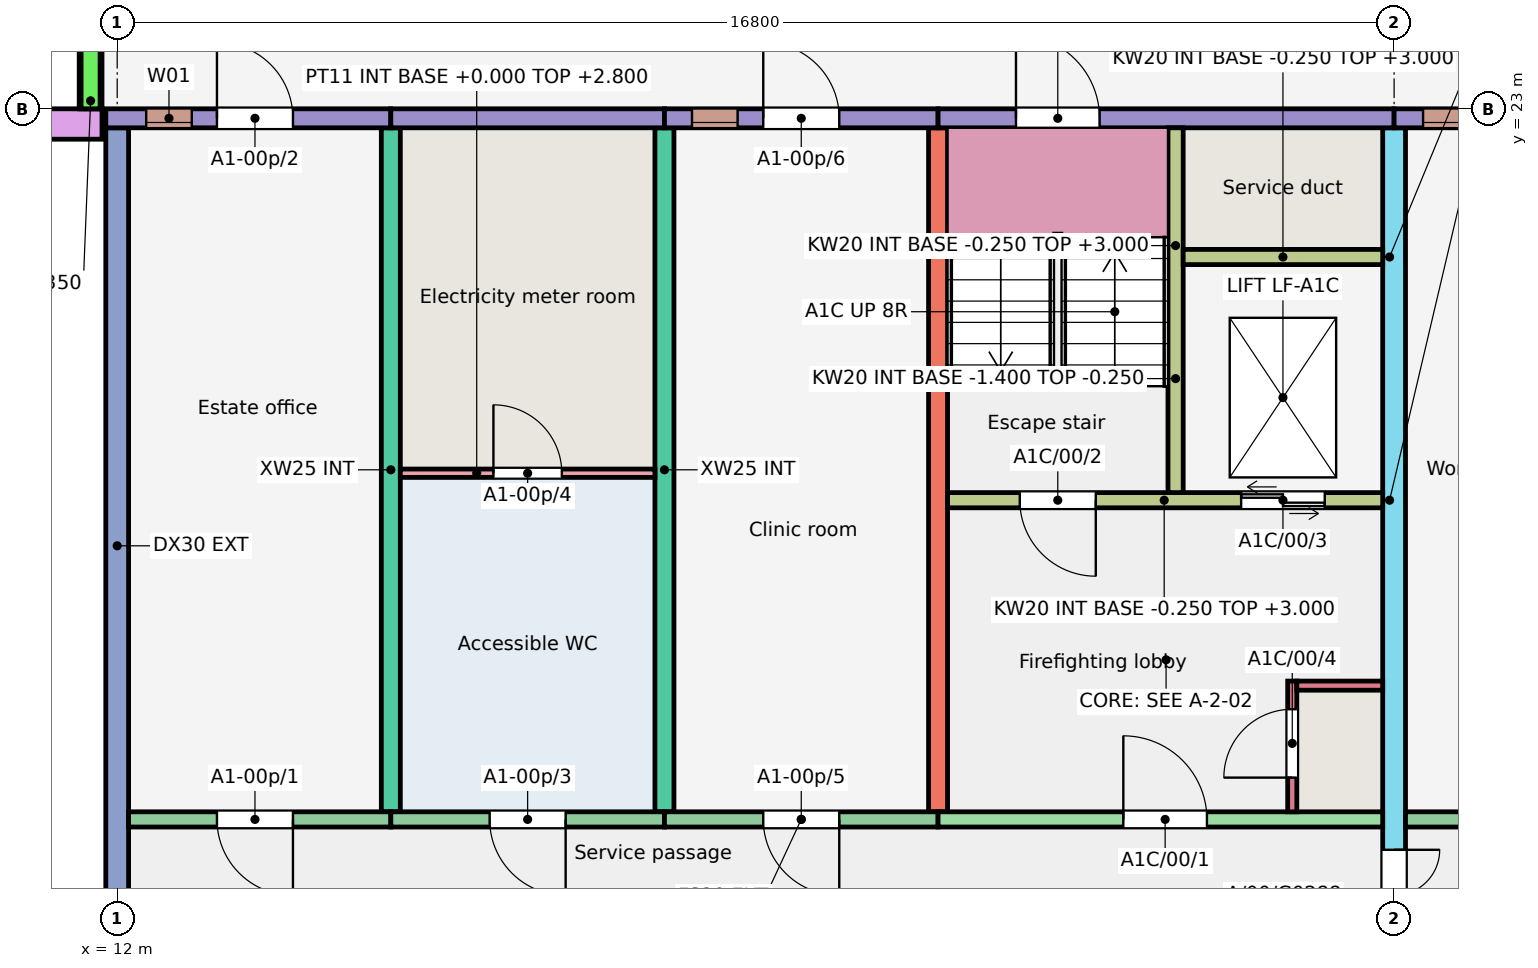
"""IFC4 building model, lengths in metres.
Left out: names, types, materials, properties, quantities, classifications, styles, units other than length and angle.
Written with IfcOpenShell. Run it as: python <this file> out.ifc"""

import sys

from ifc_helpers import new_model, si_unit, direction, frame, frame_2d, origin, place, context, subcontext, project, spatial, rectangle, extrude, element, fill, save


model = new_model("IFC4")
c1 = context("Model", 3, precision=1e-05, world=origin(), true_north=direction((0.0, 1.0)))
c2 = subcontext(c1, "Body", "Model", "MODEL_VIEW")
j1 = project(units=[si_unit("LENGTHUNIT", "METRE"), si_unit("PLANEANGLEUNIT", "RADIAN")], contexts=[c1])
p1 = place(None, origin())
s1 = spatial("IfcSite", under=j1, at=p1, CompositionType="ELEMENT")
p2 = place(p1, origin())
s2 = spatial("IfcBuilding", under=s1, at=p2, CompositionType="ELEMENT")
p3 = place(p2, origin())
s3 = spatial("IfcBuildingStorey", under=s2, at=p3, CompositionType="ELEMENT", Elevation=0.0)
p4 = place(p3, frame((12.0, 11.75, -0.25), z_axis=(0.0, 0.0, 1.0), x_axis=(0.0, 1.0, 0.0)))
e1 = element("IfcWall", 1, at=p4, inside=s3, PredefinedType="SHEAR", context=c2, shape_type="SweptSolid", body=[
    extrude(rectangle(XDim=11.0, YDim=0.3, at=frame_2d((5.5, 0.0))), origin(), (0.0, 0.0, 1.0), 3.25),
])
for number, where, z_axis, x_axis in (
    (2, (15.6, 13.75, -0.25), (0.0, 0.0, 1.0), (0.0, 1.0, 0.0)),
    (3, (19.2, 13.75, -0.25), (0.0, 0.0, 1.0), (0.0, 1.0, 0.0)),
    (4, (22.8, 13.75, -0.25), (0.0, 0.0, 1.0), (0.0, 1.0, 0.0)),
):
    element("IfcWall", number, at=place(p3, frame(where, z_axis=z_axis, x_axis=x_axis)), inside=s3, PredefinedType="SHEAR", context=c2, shape_type="SweptSolid", body=[
        extrude(rectangle(XDim=9.0, YDim=0.25, at=frame_2d((4.5, 0.0))), origin(), (0.0, 0.0, 1.0), 3.25),
    ])
p5 = place(p3, frame((28.8, 11.75, -0.25), z_axis=(0.0, 0.0, 1.0), x_axis=(0.0, 1.0, 0.0)))
e5 = element("IfcWall", 5, at=p5, inside=s3, PredefinedType="SHEAR", context=c2, shape_type="SweptSolid", body=[
    extrude(rectangle(XDim=11.0, YDim=0.3, at=frame_2d((5.5, 0.0))), origin(), (0.0, 0.0, 1.0), 3.25),
])
p6 = place(p5, frame((0.3, 0.0, 0.25)))
e6 = element("IfcOpeningElement", 6, at=p6, cuts=e5, PredefinedType="OPENING", context=c2, shape_type="SweptSolid", body=[
    extrude(rectangle(XDim=1.2, YDim=2.1, at=frame_2d((0.6, 1.05))), frame((0.0, 0.16, 0.0), z_axis=(0.0, -1.0, 0.0), x_axis=(1.0, 0.0, 0.0)), (0.0, 0.0, 1.0), 0.32),
])
p7 = place(p3, frame((11.85, 22.875, -0.25), z_axis=(0.0, 0.0, 1.0), x_axis=(1.0, 0.0, 0.0)))
e7 = element("IfcWall", 7, at=p7, inside=s3, PredefinedType="SOLIDWALL", context=c2, shape_type="SweptSolid", body=[
    extrude(rectangle(XDim=3.75, YDim=0.25, at=frame_2d((1.875, 0.0))), origin(), (0.0, 0.0, 1.0), 3.25),
])
p8 = place(p7, frame((0.531, 0.0, 2.05)))
e8 = element("IfcOpeningElement", 8, at=p8, cuts=e7, PredefinedType="OPENING", context=c2, shape_type="SweptSolid", body=[
    extrude(rectangle(XDim=0.6, YDim=0.6, at=frame_2d((0.3, 0.3))), frame((0.0, 0.135, 0.0), z_axis=(0.0, -1.0, 0.0), x_axis=(1.0, 0.0, 0.0)), (0.0, 0.0, 1.0), 0.27),
])
p9 = place(p7, frame((1.462, 0.0, 0.25)))
e9 = element("IfcOpeningElement", 9, at=p9, cuts=e7, PredefinedType="OPENING", context=c2, shape_type="SweptSolid", body=[
    extrude(rectangle(XDim=1.0, YDim=2.1, at=frame_2d((0.5, 1.05))), frame((0.0, 0.135, 0.0), z_axis=(0.0, -1.0, 0.0), x_axis=(1.0, 0.0, 0.0)), (0.0, 0.0, 1.0), 0.27),
])
p10 = place(p3, frame((12.15, 13.65, -0.25), z_axis=(0.0, 0.0, 1.0), x_axis=(1.0, 0.0, 0.0)))
e10 = element("IfcWall", 10, at=p10, inside=s3, PredefinedType="SOLIDWALL", context=c2, shape_type="SweptSolid", body=[
    extrude(rectangle(XDim=3.45, YDim=0.2, at=frame_2d((1.725, 0.0))), origin(), (0.0, 0.0, 1.0), 3.25),
])
p11 = place(p10, frame((1.163, 0.0, 0.25)))
e11 = element("IfcOpeningElement", 11, at=p11, cuts=e10, PredefinedType="OPENING", context=c2, shape_type="SweptSolid", body=[
    extrude(rectangle(XDim=1.0, YDim=2.1, at=frame_2d((0.5, 1.05))), frame((0.0, 0.11, 0.0), z_axis=(0.0, -1.0, 0.0), x_axis=(1.0, 0.0, 0.0)), (0.0, 0.0, 1.0), 0.22),
])
p12 = place(p3, frame((15.6, 22.875, -0.25), z_axis=(0.0, 0.0, 1.0), x_axis=(1.0, 0.0, 0.0)))
e12 = element("IfcWall", 12, at=p12, inside=s3, PredefinedType="SOLIDWALL", context=c2, shape_type="SweptSolid", body=[
    extrude(rectangle(XDim=3.6, YDim=0.25, at=frame_2d((1.8, 0.0))), origin(), (0.0, 0.0, 1.0), 3.25),
])
p13 = place(p3, frame((15.6, 13.65, -0.25), z_axis=(0.0, 0.0, 1.0), x_axis=(1.0, 0.0, 0.0)))
e13 = element("IfcWall", 13, at=p13, inside=s3, PredefinedType="SOLIDWALL", context=c2, shape_type="SweptSolid", body=[
    extrude(rectangle(XDim=3.6, YDim=0.2, at=frame_2d((1.8, 0.0))), origin(), (0.0, 0.0, 1.0), 3.25),
])
p14 = place(p13, frame((1.3, 0.0, 0.25)))
e14 = element("IfcOpeningElement", 14, at=p14, cuts=e13, PredefinedType="OPENING", context=c2, shape_type="SweptSolid", body=[
    extrude(rectangle(XDim=1.0, YDim=2.1, at=frame_2d((0.5, 1.05))), frame((0.0, 0.11, 0.0), z_axis=(0.0, -1.0, 0.0), x_axis=(1.0, 0.0, 0.0)), (0.0, 0.0, 1.0), 0.22),
])
p15 = place(p3, frame((19.2, 22.875, -0.25), z_axis=(0.0, 0.0, 1.0), x_axis=(1.0, 0.0, 0.0)))
e15 = element("IfcWall", 15, at=p15, inside=s3, PredefinedType="SOLIDWALL", context=c2, shape_type="SweptSolid", body=[
    extrude(rectangle(XDim=3.6, YDim=0.25, at=frame_2d((1.8, 0.0))), origin(), (0.0, 0.0, 1.0), 3.25),
])
p16 = place(p15, frame((0.363, 0.0, 2.05)))
e16 = element("IfcOpeningElement", 16, at=p16, cuts=e15, PredefinedType="OPENING", context=c2, shape_type="SweptSolid", body=[
    extrude(rectangle(XDim=0.6, YDim=0.6, at=frame_2d((0.3, 0.3))), frame((0.0, 0.135, 0.0), z_axis=(0.0, -1.0, 0.0), x_axis=(1.0, 0.0, 0.0)), (0.0, 0.0, 1.0), 0.27),
])
p17 = place(p15, frame((1.3, 0.0, 0.25)))
e17 = element("IfcOpeningElement", 17, at=p17, cuts=e15, PredefinedType="OPENING", context=c2, shape_type="SweptSolid", body=[
    extrude(rectangle(XDim=1.0, YDim=2.1, at=frame_2d((0.5, 1.05))), frame((0.0, 0.135, 0.0), z_axis=(0.0, -1.0, 0.0), x_axis=(1.0, 0.0, 0.0)), (0.0, 0.0, 1.0), 0.27),
])
p18 = place(p3, frame((19.2, 13.65, -0.25), z_axis=(0.0, 0.0, 1.0), x_axis=(1.0, 0.0, 0.0)))
e18 = element("IfcWall", 18, at=p18, inside=s3, PredefinedType="SOLIDWALL", context=c2, shape_type="SweptSolid", body=[
    extrude(rectangle(XDim=3.6, YDim=0.2, at=frame_2d((1.8, 0.0))), origin(), (0.0, 0.0, 1.0), 3.25),
])
p19 = place(p18, frame((1.3, 0.0, 0.25)))
e19 = element("IfcOpeningElement", 19, at=p19, cuts=e18, PredefinedType="OPENING", context=c2, shape_type="SweptSolid", body=[
    extrude(rectangle(XDim=1.0, YDim=2.1, at=frame_2d((0.5, 1.05))), frame((0.0, 0.11, 0.0), z_axis=(0.0, -1.0, 0.0), x_axis=(1.0, 0.0, 0.0)), (0.0, 0.0, 1.0), 0.22),
])
p20 = place(p3, frame((22.8, 22.875, -0.25), z_axis=(0.0, 0.0, 1.0), x_axis=(1.0, 0.0, 0.0)))
e20 = element("IfcWall", 20, at=p20, inside=s3, PredefinedType="SOLIDWALL", context=c2, shape_type="SweptSolid", body=[
    extrude(rectangle(XDim=6.0, YDim=0.25, at=frame_2d((3.0, 0.0))), origin(), (0.0, 0.0, 1.0), 3.25),
])
p21 = place(p20, frame((1.025, 0.0, 0.25)))
e21 = element("IfcOpeningElement", 21, at=p21, cuts=e20, PredefinedType="OPENING", context=c2, shape_type="SweptSolid", body=[
    extrude(rectangle(XDim=1.1, YDim=2.1, at=frame_2d((0.55, 1.05))), frame((0.0, 0.135, 0.0), z_axis=(0.0, -1.0, 0.0), x_axis=(1.0, 0.0, 0.0)), (0.0, 0.0, 1.0), 0.27),
])
p22 = place(p3, frame((22.8, 13.65, -0.25), z_axis=(0.0, 0.0, 1.0), x_axis=(1.0, 0.0, 0.0)))
e22 = element("IfcWall", 22, at=p22, inside=s3, PredefinedType="SHEAR", context=c2, shape_type="SweptSolid", body=[
    extrude(rectangle(XDim=5.85, YDim=0.2, at=frame_2d((2.925, 0.0))), origin(), (0.0, 0.0, 1.0), 3.25),
])
p23 = place(p22, frame((2.438, 0.0, 0.25)))
e23 = element("IfcOpeningElement", 23, at=p23, cuts=e22, PredefinedType="OPENING", context=c2, shape_type="SweptSolid", body=[
    extrude(rectangle(XDim=1.1, YDim=2.1, at=frame_2d((0.55, 1.05))), frame((0.0, 0.11, 0.0), z_axis=(0.0, -1.0, 0.0), x_axis=(1.0, 0.0, 0.0)), (0.0, 0.0, 1.0), 0.22),
])
p24 = place(p3, frame((22.925, 17.85, -0.25), z_axis=(0.0, 0.0, 1.0), x_axis=(1.0, 0.0, 0.0)))
e24 = element("IfcWall", 24, at=p24, inside=s3, PredefinedType="SHEAR", context=c2, shape_type="SweptSolid", body=[
    extrude(rectangle(XDim=5.725, YDim=0.2, at=frame_2d((2.862, 0.0))), origin(), (0.0, 0.0, 1.0), 3.25),
])
p25 = place(p24, frame((0.95, 0.0, 0.25)))
e25 = element("IfcOpeningElement", 25, at=p25, cuts=e24, PredefinedType="OPENING", context=c2, shape_type="SweptSolid", body=[
    extrude(rectangle(XDim=1.0, YDim=2.1, at=frame_2d((0.5, 1.05))), frame((0.0, 0.11, 0.0), z_axis=(0.0, -1.0, 0.0), x_axis=(1.0, 0.0, 0.0)), (0.0, 0.0, 1.0), 0.22),
])
p26 = place(p24, frame((3.863, 0.0, 0.25)))
e26 = element("IfcOpeningElement", 26, at=p26, cuts=e24, PredefinedType="OPENING", context=c2, shape_type="SweptSolid", body=[
    extrude(rectangle(XDim=1.1, YDim=2.1, at=frame_2d((0.55, 1.05))), frame((0.0, 0.11, 0.0), z_axis=(0.0, -1.0, 0.0), x_axis=(1.0, 0.0, 0.0)), (0.0, 0.0, 1.0), 0.22),
])
p27 = place(p3, frame((25.925, 17.95, -0.25), z_axis=(0.0, 0.0, 1.0), x_axis=(0.0, 1.0, 0.0)))
e27 = element("IfcWall", 27, at=p27, inside=s3, PredefinedType="SHEAR", context=c2, shape_type="SweptSolid", body=[
    extrude(rectangle(XDim=4.8, YDim=0.2, at=frame_2d((2.4, 0.0))), origin(), (0.0, 0.0, 1.0), 3.25),
])
p28 = place(p3, frame((26.025, 21.05, -0.25), z_axis=(0.0, 0.0, 1.0), x_axis=(1.0, 0.0, 0.0)))
e28 = element("IfcWall", 28, at=p28, inside=s3, PredefinedType="SHEAR", context=c2, shape_type="SweptSolid", body=[
    extrude(rectangle(XDim=2.625, YDim=0.2, at=frame_2d((1.312, 0.0))), origin(), (0.0, 0.0, 1.0), 3.25),
])
p29 = place(p3, frame((27.46, 13.75, -0.25), z_axis=(0.0, 0.0, 1.0), x_axis=(0.0, 1.0, 0.0)))
e29 = element("IfcWall", 29, at=p29, inside=s3, PredefinedType="SHEAR", context=c2, shape_type="SweptSolid", body=[
    extrude(rectangle(XDim=1.72, YDim=0.12, at=frame_2d((0.86, 0.0))), origin(), (0.0, 0.0, 1.0), 3.25),
])
p30 = place(p29, frame((0.45, 0.0, 0.25)))
e30 = element("IfcOpeningElement", 30, at=p30, cuts=e29, PredefinedType="OPENING", context=c2, shape_type="SweptSolid", body=[
    extrude(rectangle(XDim=0.9, YDim=2.1, at=frame_2d((0.45, 1.05))), frame((0.0, 0.07, 0.0), z_axis=(0.0, -1.0, 0.0), x_axis=(1.0, 0.0, 0.0)), (0.0, 0.0, 1.0), 0.14),
])
p31 = place(p3, frame((27.52, 15.41, -0.25), z_axis=(0.0, 0.0, 1.0), x_axis=(1.0, 0.0, 0.0)))
e31 = element("IfcWall", 31, at=p31, inside=s3, PredefinedType="SHEAR", context=c2, shape_type="SweptSolid", body=[
    extrude(rectangle(XDim=1.13, YDim=0.12, at=frame_2d((0.565, 0.0))), origin(), (0.0, 0.0, 1.0), 3.25),
])
p32 = place(p3, frame((28.8, 22.875, -0.25), z_axis=(0.0, 0.0, 1.0), x_axis=(1.0, 0.0, 0.0)))
e32 = element("IfcWall", 32, at=p32, inside=s3, PredefinedType="SOLIDWALL", context=c2, shape_type="SweptSolid", body=[
    extrude(rectangle(XDim=3.6, YDim=0.25, at=frame_2d((1.8, 0.0))), origin(), (0.0, 0.0, 1.0), 3.25),
])
p33 = place(p32, frame((0.381, 0.0, 2.05)))
e33 = element("IfcOpeningElement", 33, at=p33, cuts=e32, PredefinedType="OPENING", context=c2, shape_type="SweptSolid", body=[
    extrude(rectangle(XDim=0.6, YDim=0.6, at=frame_2d((0.3, 0.3))), frame((0.0, 0.135, 0.0), z_axis=(0.0, -1.0, 0.0), x_axis=(1.0, 0.0, 0.0)), (0.0, 0.0, 1.0), 0.27),
])
p34 = place(p32, frame((1.312, 0.0, 0.25)))
e34 = element("IfcOpeningElement", 34, at=p34, cuts=e32, PredefinedType="OPENING", context=c2, shape_type="SweptSolid", body=[
    extrude(rectangle(XDim=1.0, YDim=2.1, at=frame_2d((0.5, 1.05))), frame((0.0, 0.135, 0.0), z_axis=(0.0, -1.0, 0.0), x_axis=(1.0, 0.0, 0.0)), (0.0, 0.0, 1.0), 0.27),
])
p35 = place(p3, frame((28.95, 13.65, -0.25), z_axis=(0.0, 0.0, 1.0), x_axis=(1.0, 0.0, 0.0)))
e35 = element("IfcWall", 35, at=p35, inside=s3, PredefinedType="SOLIDWALL", context=c2, shape_type="SweptSolid", body=[
    extrude(rectangle(XDim=3.45, YDim=0.2, at=frame_2d((1.725, 0.0))), origin(), (0.0, 0.0, 1.0), 3.25),
])
p36 = place(p35, frame((1.163, 0.0, 0.25)))
e36 = element("IfcOpeningElement", 36, at=p36, cuts=e35, PredefinedType="OPENING", context=c2, shape_type="SweptSolid", body=[
    extrude(rectangle(XDim=1.0, YDim=2.1, at=frame_2d((0.5, 1.05))), frame((0.0, 0.11, 0.0), z_axis=(0.0, -1.0, 0.0), x_axis=(1.0, 0.0, 0.0)), (0.0, 0.0, 1.0), 0.22),
])
for number, where, z_axis, x_axis in (
    (37, (25.825, 17.85, -1.4), (0.0, 0.0, 1.0), (1.0, 0.0, 0.0)),
    (38, (25.825, 21.05, -1.4), (0.0, 0.0, 1.0), (1.0, 0.0, 0.0)),
):
    element("IfcWall", number, at=place(p3, frame(where, z_axis=z_axis, x_axis=x_axis)), inside=s3, PredefinedType="SHEAR", context=c2, shape_type="SweptSolid", body=[
        extrude(rectangle(XDim=2.975, YDim=0.2, at=frame_2d((1.488, 0.0))), origin(), (0.0, 0.0, 1.0), 1.15),
    ])
p37 = place(p3, frame((25.925, 17.95, -1.4), z_axis=(0.0, 0.0, 1.0), x_axis=(0.0, 1.0, 0.0)))
e39 = element("IfcWall", 39, at=p37, inside=s3, PredefinedType="SHEAR", context=c2, shape_type="SweptSolid", body=[
    extrude(rectangle(XDim=3.0, YDim=0.2, at=frame_2d((1.5, 0.0))), origin(), (0.0, 0.0, 1.0), 1.15),
])
p38 = place(p3, frame((28.725, 17.95, -1.4), z_axis=(0.0, 0.0, 1.0), x_axis=(0.0, 1.0, 0.0)))
e40 = element("IfcWall", 40, at=p38, inside=s3, PredefinedType="SHEAR", context=c2, shape_type="SweptSolid", body=[
    extrude(rectangle(XDim=3.0, YDim=0.15, at=frame_2d((1.5, 0.0))), origin(), (0.0, 0.0, 1.0), 1.15),
])
p39 = place(p3, frame((6.05, 22.8, -0.25), z_axis=(0.0, 0.0, 1.0), x_axis=(1.0, 0.0, 0.0)))
e41 = element("IfcWall", 41, at=p39, inside=s3, PredefinedType="SOLIDWALL", context=c2, shape_type="SweptSolid", body=[
    extrude(rectangle(XDim=5.75, YDim=0.4, at=frame_2d((2.875, 0.0))), origin(), (0.0, 0.0, 1.0), 3.25),
])
p40 = place(p3, frame((11.65, 23.0, -0.25), z_axis=(0.0, 0.0, 1.0), x_axis=(0.0, 1.0, 0.0)))
e42 = element("IfcWall", 42, at=p40, inside=s3, PredefinedType="SOLIDWALL", context=c2, shape_type="SweptSolid", body=[
    extrude(rectangle(XDim=10.5, YDim=0.3, at=frame_2d((5.25, 0.0))), origin(), (0.0, 0.0, 1.0), 2.5),
])
p41 = place(p3, frame((11.65, 23.0, 2.25), z_axis=(0.0, 0.0, 1.0), x_axis=(0.0, 1.0, 0.0)))
e43 = element("IfcWall", 43, at=p41, inside=s3, PredefinedType="PARAPET", context=c2, shape_type="SweptSolid", body=[
    extrude(rectangle(XDim=10.5, YDim=0.25, at=frame_2d((5.25, 0.0))), origin(), (0.0, 0.0, 1.0), 1.1),
])
p42 = place(p3, frame((15.725, 18.205, 0.0), z_axis=(0.0, 0.0, 1.0), x_axis=(1.0, 0.0, 0.0)))
e44 = element("IfcWall", 44, at=p42, inside=s3, PredefinedType="PARTITIONING", context=c2, shape_type="SweptSolid", body=[
    extrude(rectangle(XDim=3.35, YDim=0.11, at=frame_2d((1.675, 0.0))), origin(), (0.0, 0.0, 1.0), 2.8),
])
p43 = place(p42, frame((1.225, 0.0, 0.0)))
e45 = element("IfcOpeningElement", 45, at=p43, cuts=e44, PredefinedType="OPENING", context=c2, shape_type="SweptSolid", body=[
    extrude(rectangle(XDim=0.9, YDim=2.1, at=frame_2d((0.45, 1.05))), frame((0.0, 0.065, 0.0), z_axis=(0.0, -1.0, 0.0), x_axis=(1.0, 0.0, 0.0)), (0.0, 0.0, 1.0), 0.13),
])
p44 = place(p8, origin())
e46 = element("IfcWindow", 46, at=p44, inside=s3, PartitioningType="SINGLE_PANEL", PredefinedType="WINDOW", context=c2, shape_type="SweptSolid", body=[
    extrude(rectangle(XDim=0.6, YDim=0.6, at=frame_2d((0.3, 0.3))), frame((0.0, -0.025, 0.0), z_axis=(0.0, -1.0, 0.0), x_axis=(1.0, 0.0, 0.0)), (0.0, 0.0, 1.0), 0.06),
])
fill(e8, e46)
p45 = place(p16, origin())
e47 = element("IfcWindow", 47, at=p45, inside=s3, PartitioningType="SINGLE_PANEL", PredefinedType="WINDOW", context=c2, shape_type="SweptSolid", body=[
    extrude(rectangle(XDim=0.6, YDim=0.6, at=frame_2d((0.3, 0.3))), frame((0.0, -0.025, 0.0), z_axis=(0.0, -1.0, 0.0), x_axis=(1.0, 0.0, 0.0)), (0.0, 0.0, 1.0), 0.06),
])
fill(e16, e47)
p46 = place(p33, origin())
e48 = element("IfcWindow", 48, at=p46, inside=s3, PartitioningType="SINGLE_PANEL", PredefinedType="WINDOW", context=c2, shape_type="SweptSolid", body=[
    extrude(rectangle(XDim=0.6, YDim=0.6, at=frame_2d((0.3, 0.3))), frame((0.0, -0.025, 0.0), z_axis=(0.0, -1.0, 0.0), x_axis=(1.0, 0.0, 0.0)), (0.0, 0.0, 1.0), 0.06),
])
fill(e33, e48)
p47 = place(p11, origin())
e49 = element("IfcDoor", 49, at=p47, inside=s3, OperationType="SINGLE_SWING_RIGHT", PredefinedType="DOOR", context=c2, shape_type="SweptSolid", body=[
    extrude(rectangle(XDim=1.0, YDim=2.1, at=frame_2d((0.5, 1.05))), frame((0.0, 0.025, 0.0), z_axis=(0.0, -1.0, 0.0), x_axis=(1.0, 0.0, 0.0)), (0.0, 0.0, 1.0), 0.05),
])
fill(e11, e49)
p48 = place(p9, origin())
e50 = element("IfcDoor", 50, at=p48, inside=s3, OperationType="SINGLE_SWING_LEFT", PredefinedType="DOOR", context=c2, shape_type="SweptSolid", body=[
    extrude(rectangle(XDim=1.0, YDim=2.1, at=frame_2d((0.5, 1.05))), frame((0.0, 0.025, 0.0), z_axis=(0.0, -1.0, 0.0), x_axis=(1.0, 0.0, 0.0)), (0.0, 0.0, 1.0), 0.05),
])
fill(e9, e50)
p49 = place(p14, origin())
e51 = element("IfcDoor", 51, at=p49, inside=s3, OperationType="SINGLE_SWING_RIGHT", PredefinedType="DOOR", context=c2, shape_type="SweptSolid", body=[
    extrude(rectangle(XDim=1.0, YDim=2.1, at=frame_2d((0.5, 1.05))), frame((0.0, 0.025, 0.0), z_axis=(0.0, -1.0, 0.0), x_axis=(1.0, 0.0, 0.0)), (0.0, 0.0, 1.0), 0.05),
])
fill(e14, e51)
p50 = place(p43, origin())
e52 = element("IfcDoor", 52, at=p50, inside=s3, OperationType="SINGLE_SWING_LEFT", PredefinedType="DOOR", context=c2, shape_type="SweptSolid", body=[
    extrude(rectangle(XDim=0.9, YDim=2.1, at=frame_2d((0.45, 1.05))), frame((0.0, 0.025, 0.0), z_axis=(0.0, -1.0, 0.0), x_axis=(1.0, 0.0, 0.0)), (0.0, 0.0, 1.0), 0.05),
])
fill(e45, e52)
p51 = place(p19, origin())
e53 = element("IfcDoor", 53, at=p51, inside=s3, OperationType="SINGLE_SWING_RIGHT", PredefinedType="DOOR", context=c2, shape_type="SweptSolid", body=[
    extrude(rectangle(XDim=1.0, YDim=2.1, at=frame_2d((0.5, 1.05))), frame((0.0, 0.025, 0.0), z_axis=(0.0, -1.0, 0.0), x_axis=(1.0, 0.0, 0.0)), (0.0, 0.0, 1.0), 0.05),
])
fill(e19, e53)
p52 = place(p17, origin())
e54 = element("IfcDoor", 54, at=p52, inside=s3, OperationType="SINGLE_SWING_LEFT", PredefinedType="DOOR", context=c2, shape_type="SweptSolid", body=[
    extrude(rectangle(XDim=1.0, YDim=2.1, at=frame_2d((0.5, 1.05))), frame((0.0, 0.025, 0.0), z_axis=(0.0, -1.0, 0.0), x_axis=(1.0, 0.0, 0.0)), (0.0, 0.0, 1.0), 0.05),
])
fill(e17, e54)
p53 = place(p23, origin())
e55 = element("IfcDoor", 55, at=p53, inside=s3, OperationType="SINGLE_SWING_LEFT", PredefinedType="DOOR", context=c2, shape_type="SweptSolid", body=[
    extrude(rectangle(XDim=1.1, YDim=2.1, at=frame_2d((0.55, 1.05))), frame((0.0, 0.025, 0.0), z_axis=(0.0, -1.0, 0.0), x_axis=(1.0, 0.0, 0.0)), (0.0, 0.0, 1.0), 0.05),
])
fill(e23, e55)
p54 = place(p25, origin())
e56 = element("IfcDoor", 56, at=p54, inside=s3, OperationType="SINGLE_SWING_RIGHT", PredefinedType="DOOR", context=c2, shape_type="SweptSolid", body=[
    extrude(rectangle(XDim=1.0, YDim=2.1, at=frame_2d((0.5, 1.05))), frame((0.0, 0.025, 0.0), z_axis=(0.0, -1.0, 0.0), x_axis=(1.0, 0.0, 0.0)), (0.0, 0.0, 1.0), 0.05),
])
fill(e25, e56)
p55 = place(p26, origin())
e57 = element("IfcDoor", 57, at=p55, inside=s3, OperationType="DOUBLE_DOOR_SLIDING", PredefinedType="DOOR", context=c2, shape_type="SweptSolid", body=[
    extrude(rectangle(XDim=1.1, YDim=2.1, at=frame_2d((0.55, 1.05))), frame((0.0, 0.025, 0.0), z_axis=(0.0, -1.0, 0.0), x_axis=(1.0, 0.0, 0.0)), (0.0, 0.0, 1.0), 0.05),
])
fill(e26, e57)
p56 = place(p30, origin())
e58 = element("IfcDoor", 58, at=p56, inside=s3, OperationType="SINGLE_SWING_LEFT", PredefinedType="DOOR", context=c2, shape_type="SweptSolid", body=[
    extrude(rectangle(XDim=0.9, YDim=2.1, at=frame_2d((0.45, 1.05))), frame((0.0, 0.025, 0.0), z_axis=(0.0, -1.0, 0.0), x_axis=(1.0, 0.0, 0.0)), (0.0, 0.0, 1.0), 0.05),
])
fill(e30, e58)
p57 = place(p21, origin())
e59 = element("IfcDoor", 59, at=p57, inside=s3, OperationType="SINGLE_SWING_LEFT", PredefinedType="DOOR", context=c2, shape_type="SweptSolid", body=[
    extrude(rectangle(XDim=1.1, YDim=2.1, at=frame_2d((0.55, 1.05))), frame((0.0, 0.025, 0.0), z_axis=(0.0, -1.0, 0.0), x_axis=(1.0, 0.0, 0.0)), (0.0, 0.0, 1.0), 0.05),
])
fill(e21, e59)
p58 = place(p6, origin())
e60 = element("IfcDoor", 60, at=p58, inside=s3, OperationType="DOUBLE_DOOR_SINGLE_SWING", PredefinedType="DOOR", context=c2, shape_type="SweptSolid", body=[
    extrude(rectangle(XDim=1.2, YDim=2.1, at=frame_2d((0.6, 1.05))), frame((0.0, 0.025, 0.0), z_axis=(0.0, -1.0, 0.0), x_axis=(1.0, 0.0, 0.0)), (0.0, 0.0, 1.0), 0.05),
])
fill(e6, e60)
save(model, sys.argv[1])
